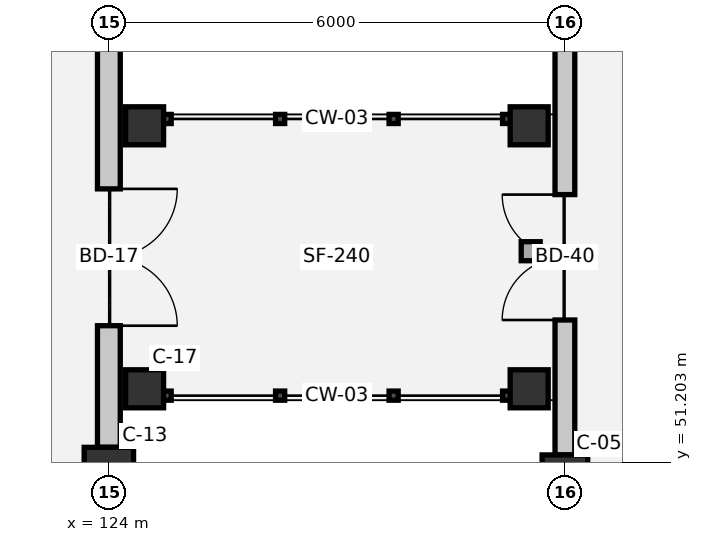
"""IFC4 building model, lengths in metres.
Left out: names, types, materials, properties, quantities, classifications, styles, units other than length and angle.
Written with IfcOpenShell. Run it as: python <this file> out.ifc"""

import sys

from ifc_helpers import new_model, si_unit, direction, frame, frame_2d, origin, origin_2d, place, context, subcontext, project, spatial, rectangle, extrude, element, fill, save


model = new_model("IFC4")
c1 = context("Model", 3, precision=1e-05, world=origin(), true_north=direction((0.0, 1.0)))
c2 = subcontext(c1, "Body", "Model", "MODEL_VIEW")
j1 = project(units=[si_unit("LENGTHUNIT", "METRE"), si_unit("PLANEANGLEUNIT", "RADIAN")], contexts=[c1])
p1 = place(None, origin())
s1 = spatial("IfcSite", under=j1, at=p1, CompositionType="ELEMENT")
p2 = place(p1, origin())
s2 = spatial("IfcBuilding", under=s1, at=p2, CompositionType="ELEMENT")
p3 = place(p2, frame((0.0, 0.0, 18.3)))
s3 = spatial("IfcBuildingStorey", under=s2, at=p3, CompositionType="ELEMENT", Elevation=18.3)
p4 = place(p3, frame((124.0, 51.0, 0.0), z_axis=(0.0, 0.0, 1.0), x_axis=(1.0, 0.0, 0.0)))
e1 = element("IfcColumn", 1, at=p4, inside=s3, PredefinedType="COLUMN", context=c2, shape_type="SweptSolid", body=[
    extrude(rectangle(XDim=0.65, YDim=0.8, at=origin_2d()), origin(), (0.0, 0.0, 1.0), 3.75),
])
p5 = place(p3, frame((130.0, 51.0, 0.0), z_axis=(0.0, 0.0, 1.0), x_axis=(1.0, 0.0, 0.0)))
e2 = element("IfcColumn", 2, at=p5, inside=s3, PredefinedType="COLUMN", context=c2, shape_type="SweptSolid", body=[
    extrude(rectangle(XDim=0.6, YDim=0.6, at=origin_2d()), origin(), (0.0, 0.0, 1.0), 3.75),
])
for number, where, z_axis, x_axis in (
    (3, (124.47, 52.17, 0.0), (0.0, 0.0, 1.0), (1.0, 0.0, 0.0)),
    (4, (129.53, 52.17, 0.0), (0.0, 0.0, 1.0), (1.0, 0.0, 0.0)),
    (5, (124.47, 55.63, 0.0), (0.0, 0.0, 1.0), (1.0, 0.0, 0.0)),
    (6, (129.53, 55.63, 0.0), (0.0, 0.0, 1.0), (1.0, 0.0, 0.0)),
):
    element("IfcColumn", number, at=place(p3, frame(where, z_axis=z_axis, x_axis=x_axis)), inside=s3, PredefinedType="COLUMN", context=c2, shape_type="SweptSolid", body=[
        extrude(rectangle(XDim=0.5, YDim=0.5, at=origin_2d()), origin(), (0.0, 0.0, 1.0), 3.52),
    ])
p6 = place(p3, frame((124.0, 64.6, 0.0), z_axis=(0.0, 0.0, 1.0), x_axis=(0.0, -1.0, 0.0)))
e7 = element("IfcWall", 7, at=p6, inside=s3, PredefinedType="SOLIDWALL", context=c2, shape_type="SweptSolid", body=[
    extrude(rectangle(XDim=13.2, YDim=0.3, at=frame_2d((6.6, 0.0))), origin(), (0.0, 0.0, 1.0), 2.6),
])
p7 = place(p6, frame((9.8, 0.0, 0.0)))
e8 = element("IfcOpeningElement", 8, at=p7, cuts=e7, PredefinedType="OPENING", context=c2, shape_type="SweptSolid", body=[
    extrude(rectangle(XDim=1.8, YDim=2.25, at=frame_2d((0.9, 1.125))), frame((0.0, 0.16, 0.0), z_axis=(0.0, -1.0, 0.0), x_axis=(1.0, 0.0, 0.0)), (0.0, 0.0, 1.0), 0.32),
])
p8 = place(p3, frame((130.0, 51.3, 0.0), z_axis=(0.0, 0.0, 1.0), x_axis=(0.0, 1.0, 0.0)))
e9 = element("IfcWall", 9, at=p8, inside=s3, PredefinedType="SOLIDWALL", context=c2, shape_type="SweptSolid", body=[
    extrude(rectangle(XDim=13.4, YDim=0.26, at=frame_2d((6.7, 0.0))), origin(), (0.0, 0.0, 1.0), 2.55),
])
p9 = place(p8, frame((1.775, 0.0, 0.0)))
e10 = element("IfcOpeningElement", 10, at=p9, cuts=e9, PredefinedType="OPENING", context=c2, shape_type="SweptSolid", body=[
    extrude(rectangle(XDim=1.65, YDim=2.2, at=frame_2d((0.825, 1.1))), frame((0.0, 0.14, 0.0), z_axis=(0.0, -1.0, 0.0), x_axis=(1.0, 0.0, 0.0)), (0.0, 0.0, 1.0), 0.28),
])
p10 = place(p7, origin())
e11 = element("IfcDoor", 11, at=p10, inside=s3, OperationType="DOUBLE_DOOR_SINGLE_SWING", PredefinedType="DOOR", context=c2, shape_type="SweptSolid", body=[
    extrude(rectangle(XDim=1.8, YDim=2.25, at=frame_2d((0.9, 1.125))), frame((0.0, 0.025, 0.0), z_axis=(0.0, -1.0, 0.0), x_axis=(1.0, 0.0, 0.0)), (0.0, 0.0, 1.0), 0.05),
])
fill(e8, e11)
p11 = place(p9, origin())
e12 = element("IfcDoor", 12, at=p11, inside=s3, OperationType="DOUBLE_DOOR_SINGLE_SWING", PredefinedType="DOOR", context=c2, shape_type="SweptSolid", body=[
    extrude(rectangle(XDim=1.65, YDim=2.2, at=frame_2d((0.825, 1.1))), frame((0.0, 0.025, 0.0), z_axis=(0.0, -1.0, 0.0), x_axis=(1.0, 0.0, 0.0)), (0.0, 0.0, 1.0), 0.05),
])
fill(e10, e12)
save(model, sys.argv[1])
